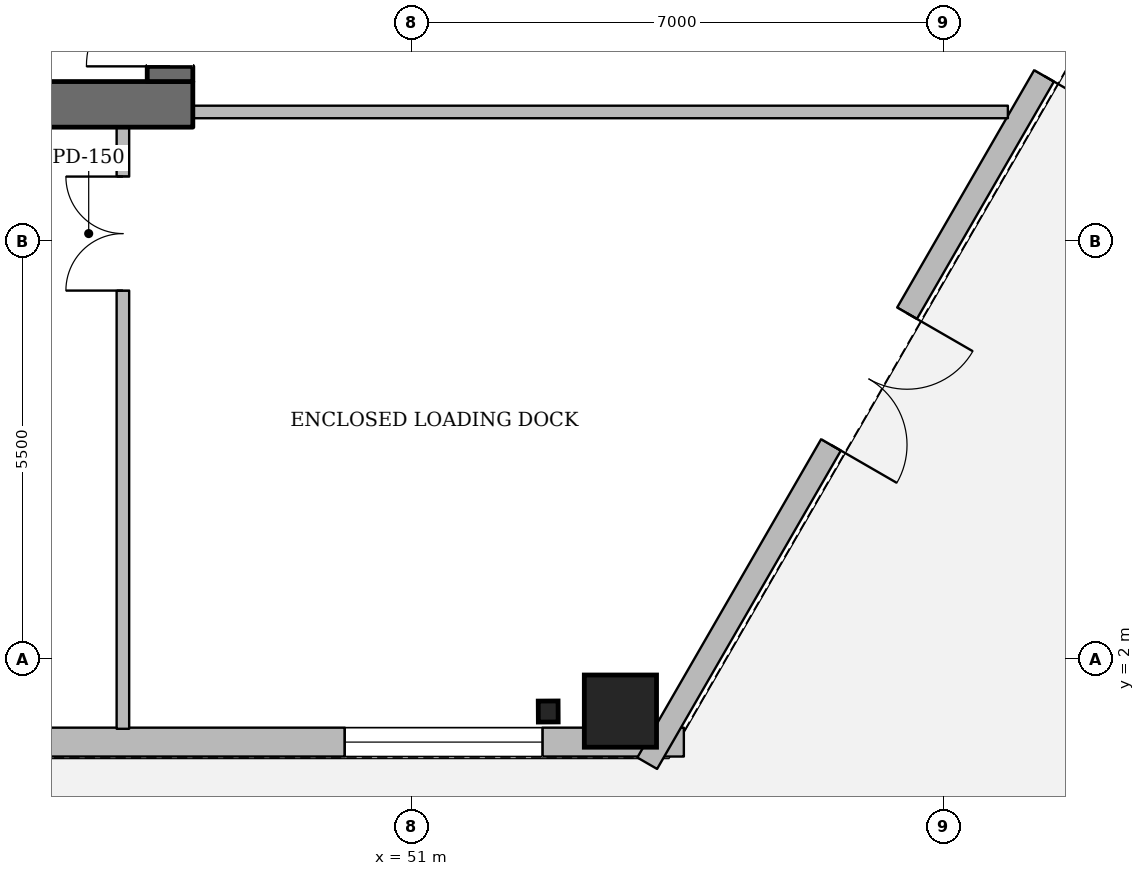
"""IFC4 building model, lengths in metres.
Left out: names, types, materials, properties, quantities, classifications, styles, units other than length and angle.
Written with IfcOpenShell. Run it as: python <this file> out.ifc"""

import sys

from ifc_helpers import new_model, si_unit, direction, frame, frame_2d, origin, origin_2d, place, context, subcontext, project, spatial, rectangle, hollow_rectangle, i_section, extrude, element, fill, save


model = new_model("IFC4")
c1 = context("Model", 3, precision=1e-05, world=origin(), true_north=direction((0.0, 1.0)))
c2 = subcontext(c1, "Body", "Model", "MODEL_VIEW")
j1 = project(units=[si_unit("LENGTHUNIT", "METRE"), si_unit("PLANEANGLEUNIT", "RADIAN")], contexts=[c1])
p1 = place(None, origin())
s1 = spatial("IfcSite", under=j1, at=p1, CompositionType="ELEMENT")
p2 = place(p1, origin())
s2 = spatial("IfcBuilding", under=s1, at=p2, CompositionType="ELEMENT")
p3 = place(p2, origin())
s3 = spatial("IfcBuildingStorey", under=s2, at=p3, CompositionType="ELEMENT", Elevation=0.0)
p4 = place(p3, frame((27.88, 9.3, 0.0), z_axis=(0.0, 0.0, 1.0), x_axis=(1.0, 0.0, 0.0)))
e1 = element("IfcWall", 1, at=p4, inside=s3, PredefinedType="SOLIDWALL", context=c2, shape_type="SweptSolid", body=[
    extrude(rectangle(XDim=20.24, YDim=0.6, at=frame_2d((10.12, 0.0))), origin(), (0.0, 0.0, 1.0), 5.74),
])
p5 = place(p4, frame((10.62, 0.0, 0.0)))
e2 = element("IfcOpeningElement", 2, at=p5, cuts=e1, PredefinedType="OPENING", context=c2, shape_type="SweptSolid", body=[
    extrude(rectangle(XDim=1.4, YDim=2.2, at=frame_2d((0.7, 1.1))), frame((0.0, 0.31, 0.0), z_axis=(0.0, -1.0, 0.0), x_axis=(1.0, 0.0, 0.0)), (0.0, 0.0, 1.0), 0.62),
])
p6 = place(p3, frame((47.82, 9.6, 0.0), z_axis=(0.0, 0.0, 1.0), x_axis=(0.0, 1.0, 0.0)))
e3 = element("IfcWall", 3, at=p6, inside=s3, PredefinedType="SOLIDWALL", context=c2, shape_type="SweptSolid", body=[
    extrude(rectangle(XDim=13.0, YDim=0.6, at=frame_2d((6.5, 0.0))), origin(), (0.0, 0.0, 1.0), 5.74),
])
p7 = place(p6, frame((8.4, 0.0, 0.0)))
e4 = element("IfcOpeningElement", 4, at=p7, cuts=e3, PredefinedType="OPENING", context=c2, shape_type="SweptSolid", body=[
    extrude(rectangle(XDim=0.9, YDim=2.1, at=frame_2d((0.45, 1.05))), frame((0.0, 0.31, 0.0), z_axis=(0.0, -1.0, 0.0), x_axis=(1.0, 0.0, 0.0)), (0.0, 0.0, 1.0), 0.62),
])
p8 = place(p6, frame((0.2, 0.0, 0.0)))
e5 = element("IfcOpeningElement", 5, at=p8, cuts=e3, PredefinedType="OPENING", context=c2, shape_type="SweptSolid", body=[
    extrude(rectangle(XDim=1.1, YDim=2.15, at=frame_2d((0.55, 1.075))), frame((0.0, 0.31, 0.0), z_axis=(0.0, -1.0, 0.0), x_axis=(1.0, 0.0, 0.0)), (0.0, 0.0, 1.0), 0.62),
])
p9 = place(p3, frame((53.746, 1.318, 0.0), z_axis=(0.0, 0.0, 1.0), x_axis=(1.0, 0.0, 0.0)))
e6 = element("IfcColumn", 6, at=p9, inside=s3, PredefinedType="COLUMN", context=c2, shape_type="SweptSolid", body=[
    extrude(hollow_rectangle(XDim=0.95, YDim=0.95, WallThickness=0.04, at=origin_2d()), origin(), (0.0, 0.0, 1.0), 5.74),
])
p10 = place(p3, frame((52.795, 1.312, 0.0), z_axis=(0.0, 0.0, 1.0), x_axis=(0.999985363169, 0.005410494284, 0.0)))
e7 = element("IfcColumn", 7, at=p10, inside=s3, PredefinedType="PILASTER", context=c2, shape_type="SweptSolid", body=[
    extrude(i_section(OverallWidth=0.261, OverallDepth=0.276, WebThickness=0.015, FlangeThickness=0.025, at=origin_2d()), origin(), (0.0, 0.0, 1.0), 5.74),
])
p11 = place(p3, frame((54.58, 0.91, 0.0), z_axis=(0.0, 0.0, 1.0), x_axis=(-1.0, 0.0, 0.0)))
e8 = element("IfcWall", 8, at=p11, inside=s3, PredefinedType="STANDARD", context=c2, shape_type="SweptSolid", body=[
    extrude(rectangle(XDim=33.16, YDim=0.38, at=frame_2d((16.58, 0.0))), origin(), (0.0, 0.0, 1.0), 3.43),
])
p12 = place(p11, frame((9.28, 0.0, 0.0)))
e9 = element("IfcOpeningElement", 9, at=p12, cuts=e8, PredefinedType="OPENING", context=c2, shape_type="SweptSolid", body=[
    extrude(rectangle(XDim=1.8, YDim=2.25, at=frame_2d((0.9, 1.125))), frame((0.0, 0.2, 0.0), z_axis=(0.0, -1.0, 0.0), x_axis=(1.0, 0.0, 0.0)), (0.0, 0.0, 1.0), 0.4),
])
p13 = place(p11, frame((12.78, 0.0, 0.0)))
e10 = element("IfcOpeningElement", 10, at=p13, cuts=e8, PredefinedType="OPENING", context=c2, shape_type="SweptSolid", body=[
    extrude(rectangle(XDim=2.0, YDim=2.6, at=frame_2d((1.0, 1.3))), frame((0.0, 0.2, 0.0), z_axis=(0.0, -1.0, 0.0), x_axis=(1.0, 0.0, 0.0)), (0.0, 0.0, 1.0), 0.4),
])
p14 = place(p11, frame((28.699, 0.0, 0.55)))
e11 = element("IfcOpeningElement", 11, at=p14, cuts=e8, PredefinedType="OPENING", context=c2, shape_type="SweptSolid", body=[
    extrude(rectangle(XDim=2.6, YDim=2.55, at=frame_2d((1.3, 1.275))), frame((0.0, 0.2, 0.0), z_axis=(0.0, -1.0, 0.0), x_axis=(1.0, 0.0, 0.0)), (0.0, 0.0, 1.0), 0.4),
])
p15 = place(p11, frame((1.861, 0.0, 0.55)))
e12 = element("IfcOpeningElement", 12, at=p15, cuts=e8, PredefinedType="OPENING", context=c2, shape_type="SweptSolid", body=[
    extrude(rectangle(XDim=2.6, YDim=2.55, at=frame_2d((1.3, 1.275))), frame((0.0, 0.2, 0.0), z_axis=(0.0, -1.0, 0.0), x_axis=(1.0, 0.0, 0.0)), (0.0, 0.0, 1.0), 0.4),
])
p16 = place(p3, frame((62.823, 15.743, 0.0), z_axis=(0.0, 0.0, 1.0), x_axis=(-0.500005062714, -0.866022480806, 0.0)))
e13 = element("IfcWall", 13, at=p16, inside=s3, PredefinedType="STANDARD", context=c2, shape_type="SweptSolid", body=[
    extrude(rectangle(XDim=17.448, YDim=0.3, at=frame_2d((8.724, 0.0))), origin(), (0.0, 0.0, 1.0), 3.43),
])
p17 = place(p16, frame((5.206, 0.0, 0.0)))
e14 = element("IfcOpeningElement", 14, at=p17, cuts=e13, PredefinedType="OPENING", context=c2, shape_type="SweptSolid", body=[
    extrude(rectangle(XDim=1.8, YDim=2.25, at=frame_2d((0.9, 1.125))), frame((0.0, 0.16, 0.0), z_axis=(0.0, -1.0, 0.0), x_axis=(1.0, 0.0, 0.0)), (0.0, 0.0, 1.0), 0.32),
])
p18 = place(p16, frame((10.612, 0.0, 0.0)))
e15 = element("IfcOpeningElement", 15, at=p18, cuts=e13, PredefinedType="OPENING", context=c2, shape_type="SweptSolid", body=[
    extrude(rectangle(XDim=2.0, YDim=2.6, at=frame_2d((1.0, 1.3))), frame((0.0, 0.16, 0.0), z_axis=(0.0, -1.0, 0.0), x_axis=(1.0, 0.0, 0.0)), (0.0, 0.0, 1.0), 0.32),
])
p19 = place(p3, frame((58.843, 9.2, 0.0), z_axis=(0.0, 0.0, 1.0), x_axis=(-1.0, 0.0, 0.0)))
e16 = element("IfcWall", 16, at=p19, inside=s3, PredefinedType="PARTITIONING", context=c2, shape_type="SweptSolid", body=[
    extrude(rectangle(XDim=10.723, YDim=0.165, at=frame_2d((5.361, 0.0))), origin(), (0.0, 0.0, 1.0), 5.74),
])
p20 = place(p3, frame((47.2, 1.085, 0.0), z_axis=(0.0, 0.0, 1.0), x_axis=(0.0, 1.0, 0.0)))
e17 = element("IfcWall", 17, at=p20, inside=s3, PredefinedType="PARTITIONING", context=c2, shape_type="SweptSolid", body=[
    extrude(rectangle(XDim=8.035, YDim=0.165, at=frame_2d((4.018, 0.0))), origin(), (0.0, 0.0, 1.0), 5.74),
])
p21 = place(p20, frame((5.765, 0.0, 0.0)))
e18 = element("IfcOpeningElement", 18, at=p21, cuts=e17, PredefinedType="OPENING", context=c2, shape_type="SweptSolid", body=[
    extrude(rectangle(XDim=1.5, YDim=2.25, at=frame_2d((0.75, 1.125))), frame((0.0, 0.093, 0.0), z_axis=(0.0, -1.0, 0.0), x_axis=(1.0, 0.0, 0.0)), (0.0, 0.0, 1.0), 0.185),
])
p22 = place(p17, origin())
e19 = element("IfcDoor", 19, at=p22, inside=s3, OperationType="DOUBLE_DOOR_SINGLE_SWING", PredefinedType="DOOR", context=c2, shape_type="SweptSolid", body=[
    extrude(rectangle(XDim=1.8, YDim=2.25, at=frame_2d((0.9, 1.125))), frame((0.0, 0.025, 0.0), z_axis=(0.0, -1.0, 0.0), x_axis=(1.0, 0.0, 0.0)), (0.0, 0.0, 1.0), 0.05),
])
fill(e14, e19)
p23 = place(p18, origin())
e20 = element("IfcDoor", 20, at=p23, inside=s3, OperationType="DOUBLE_DOOR_SINGLE_SWING", PredefinedType="DOOR", context=c2, shape_type="SweptSolid", body=[
    extrude(rectangle(XDim=2.0, YDim=2.6, at=frame_2d((1.0, 1.3))), frame((0.0, 0.025, 0.0), z_axis=(0.0, -1.0, 0.0), x_axis=(1.0, 0.0, 0.0)), (0.0, 0.0, 1.0), 0.05),
])
fill(e15, e20)
p24 = place(p15, origin())
e21 = element("IfcWindow", 21, at=p24, inside=s3, PartitioningType="SINGLE_PANEL", PredefinedType="WINDOW", context=c2, shape_type="SweptSolid", body=[
    extrude(rectangle(XDim=2.6, YDim=2.55, at=frame_2d((1.3, 1.275))), frame((0.0, 0.03, 0.0), z_axis=(0.0, -1.0, 0.0), x_axis=(1.0, 0.0, 0.0)), (0.0, 0.0, 1.0), 0.06),
])
fill(e12, e21)
p25 = place(p8, origin())
e22 = element("IfcDoor", 22, at=p25, inside=s3, OperationType="SINGLE_SWING_LEFT", PredefinedType="DOOR", context=c2, shape_type="SweptSolid", body=[
    extrude(rectangle(XDim=1.1, YDim=2.15, at=frame_2d((0.55, 1.075))), frame((0.0, 0.025, 0.0), z_axis=(0.0, -1.0, 0.0), x_axis=(1.0, 0.0, 0.0)), (0.0, 0.0, 1.0), 0.05),
])
fill(e5, e22)
p26 = place(p21, origin())
e23 = element("IfcDoor", 23, at=p26, inside=s3, OperationType="DOUBLE_DOOR_SINGLE_SWING", PredefinedType="DOOR", context=c2, shape_type="SweptSolid", body=[
    extrude(rectangle(XDim=1.5, YDim=2.25, at=frame_2d((0.75, 1.125))), frame((0.0, 0.025, 0.0), z_axis=(0.0, -1.0, 0.0), x_axis=(1.0, 0.0, 0.0)), (0.0, 0.0, 1.0), 0.05),
])
fill(e18, e23)
save(model, sys.argv[1])
